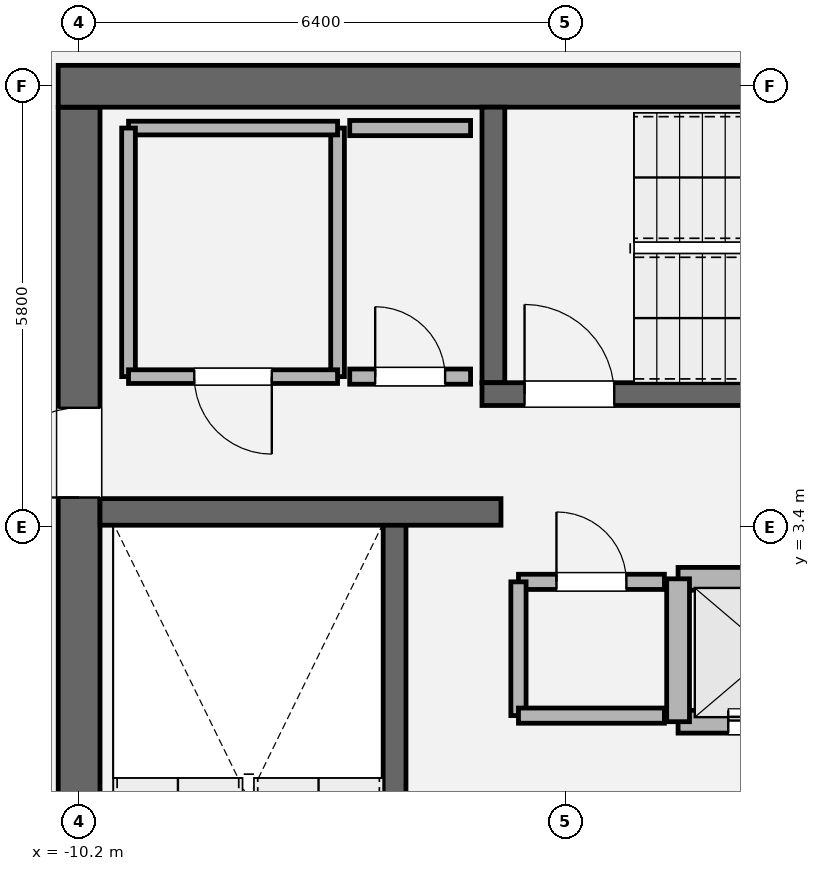
"""IFC4 building model, lengths in metres.
Left out: names, types, materials, properties, quantities, classifications, styles, units other than length and angle.
Written with IfcOpenShell. Run it as: python <this file> out.ifc"""

import sys

from ifc_helpers import new_model, si_unit, direction, frame, frame_2d, origin, place, context, subcontext, project, spatial, rectangle, extrude, element, fill, save


model = new_model("IFC4")
c1 = context("Model", 3, precision=1e-05, world=origin(), true_north=direction((0.0, 1.0)))
c2 = subcontext(c1, "Body", "Model", "MODEL_VIEW")
j1 = project(units=[si_unit("LENGTHUNIT", "METRE"), si_unit("PLANEANGLEUNIT", "RADIAN")], contexts=[c1])
p1 = place(None, origin())
s1 = spatial("IfcSite", under=j1, at=p1, CompositionType="ELEMENT")
p2 = place(p1, origin())
s2 = spatial("IfcBuilding", under=s1, at=p2, CompositionType="ELEMENT")
p3 = place(p2, frame((0.0, 0.0, 304.8)))
s3 = spatial("IfcBuildingStorey", under=s2, at=p3, CompositionType="ELEMENT", Elevation=304.8)
p4 = place(p3, frame((-10.2, -8.925, 0.0), z_axis=(0.0, 0.0, 1.0), x_axis=(0.0, 1.0, 0.0)))
e1 = element("IfcWall", 1, at=p4, inside=s3, PredefinedType="SHEAR", context=c2, shape_type="SweptSolid", body=[
    extrude(rectangle(XDim=17.85, YDim=0.55, at=frame_2d((8.925, 0.0))), origin(), (0.0, 0.0, 1.0), 4.2),
])
p5 = place(p4, frame((12.715, 0.0, 0.0)))
e2 = element("IfcOpeningElement", 2, at=p5, cuts=e1, PredefinedType="OPENING", context=c2, shape_type="SweptSolid", body=[
    extrude(rectangle(XDim=1.18, YDim=2.2, at=frame_2d((0.59, 1.1))), frame((0.0, 0.285, 0.0), z_axis=(0.0, -1.0, 0.0), x_axis=(1.0, 0.0, 0.0)), (0.0, 0.0, 1.0), 0.57),
])
p6 = place(p3, frame((-10.475, 9.2, 0.0), z_axis=(0.0, 0.0, 1.0), x_axis=(1.0, 0.0, 0.0)))
e3 = element("IfcWall", 3, at=p6, inside=s3, PredefinedType="SHEAR", context=c2, shape_type="SweptSolid", body=[
    extrude(rectangle(XDim=20.95, YDim=0.55, at=frame_2d((10.475, 0.0))), origin(), (0.0, 0.0, 1.0), 4.2),
])
p7 = place(p3, frame((-6.05, -5.5, 0.0), z_axis=(0.0, 0.0, 1.0), x_axis=(0.0, 1.0, 0.0)))
e4 = element("IfcWall", 4, at=p7, inside=s3, PredefinedType="SOLIDWALL", context=c2, shape_type="SweptSolid", body=[
    extrude(rectangle(XDim=8.95, YDim=0.3, at=frame_2d((4.475, 0.0))), origin(), (0.0, 0.0, 1.0), 4.2),
])
p8 = place(p3, frame((-4.75, 5.3, 0.0), z_axis=(0.0, 0.0, 1.0), x_axis=(0.0, 1.0, 0.0)))
e5 = element("IfcWall", 5, at=p8, inside=s3, PredefinedType="SOLIDWALL", context=c2, shape_type="SweptSolid", body=[
    extrude(rectangle(XDim=3.625, YDim=0.3, at=frame_2d((1.812, 0.0))), origin(), (0.0, 0.0, 1.0), 4.2),
])
p9 = place(p3, frame((-4.9, 5.15, 0.0), z_axis=(0.0, 0.0, 1.0), x_axis=(1.0, 0.0, 0.0)))
e6 = element("IfcWall", 6, at=p9, inside=s3, PredefinedType="SOLIDWALL", context=c2, shape_type="SweptSolid", body=[
    extrude(rectangle(XDim=9.8, YDim=0.3, at=frame_2d((4.9, 0.0))), origin(), (0.0, 0.0, 1.0), 4.2),
])
p10 = place(p9, frame((0.56, 0.0, 0.0)))
e7 = element("IfcOpeningElement", 7, at=p10, cuts=e6, PredefinedType="OPENING", context=c2, shape_type="SweptSolid", body=[
    extrude(rectangle(XDim=1.18, YDim=2.2, at=frame_2d((0.59, 1.1))), frame((0.0, 0.16, 0.0), z_axis=(0.0, -1.0, 0.0), x_axis=(1.0, 0.0, 0.0)), (0.0, 0.0, 1.0), 0.32),
])
p11 = place(p3, frame((-9.925, 3.6, 0.0), z_axis=(0.0, 0.0, 1.0), x_axis=(1.0, 0.0, 0.0)))
e8 = element("IfcWall", 8, at=p11, inside=s3, PredefinedType="SOLIDWALL", context=c2, shape_type="SweptSolid", body=[
    extrude(rectangle(XDim=5.275, YDim=0.35, at=frame_2d((2.638, 0.0))), origin(), (0.0, 0.0, 1.0), 4.2),
])
p12 = place(p3, frame((-2.32, 0.84, 0.0), z_axis=(0.0, 0.0, 1.0), x_axis=(1.0, 0.0, 0.0)))
e9 = element("IfcWall", 9, at=p12, inside=s3, PredefinedType="SOLIDWALL", context=c2, shape_type="SweptSolid", body=[
    extrude(rectangle(XDim=4.64, YDim=0.3, at=frame_2d((2.32, 0.0))), origin(), (0.0, 0.0, 1.0), 4.0),
])
p13 = place(p12, frame((0.66, 0.0, 0.0)))
e10 = element("IfcOpeningElement", 10, at=p13, cuts=e9, PredefinedType="OPENING", context=c2, shape_type="SweptSolid", body=[
    extrude(rectangle(XDim=1.12, YDim=2.25, at=frame_2d((0.56, 1.125))), frame((0.0, 0.16, 0.0), z_axis=(0.0, -1.0, 0.0), x_axis=(1.0, 0.0, 0.0)), (0.0, 0.0, 1.0), 0.32),
])
p14 = place(p12, frame((2.86, 0.0, 0.0)))
e11 = element("IfcOpeningElement", 11, at=p14, cuts=e9, PredefinedType="OPENING", context=c2, shape_type="SweptSolid", body=[
    extrude(rectangle(XDim=1.12, YDim=2.25, at=frame_2d((0.56, 1.125))), frame((0.0, 0.16, 0.0), z_axis=(0.0, -1.0, 0.0), x_axis=(1.0, 0.0, 0.0)), (0.0, 0.0, 1.0), 0.32),
])
p15 = place(p3, frame((-2.32, 2.72, 0.0), z_axis=(0.0, 0.0, 1.0), x_axis=(1.0, 0.0, 0.0)))
e12 = element("IfcWall", 12, at=p15, inside=s3, PredefinedType="SOLIDWALL", context=c2, shape_type="SweptSolid", body=[
    extrude(rectangle(XDim=4.64, YDim=0.3, at=frame_2d((2.32, 0.0))), origin(), (0.0, 0.0, 1.0), 4.0),
])
p16 = place(p3, frame((-2.32, 0.84, 0.0), z_axis=(0.0, 0.0, 1.0), x_axis=(0.0, 1.0, 0.0)))
e13 = element("IfcWall", 13, at=p16, inside=s3, PredefinedType="SOLIDWALL", context=c2, shape_type="SweptSolid", body=[
    extrude(rectangle(XDim=1.88, YDim=0.3, at=frame_2d((0.94, 0.0))), origin(), (0.0, 0.0, 1.0), 4.0),
])
p17 = place(p3, frame((-2.5, 2.68, 0.0), z_axis=(0.0, 0.0, 1.0), x_axis=(-1.0, 0.0, 0.0)))
e14 = element("IfcWall", 14, at=p17, inside=s3, PredefinedType="SOLIDWALL", context=c2, shape_type="SweptSolid", body=[
    extrude(rectangle(XDim=1.92, YDim=0.2, at=frame_2d((0.96, 0.0))), origin(), (0.0, 0.0, 1.0), 4.0),
])
p18 = place(p17, frame((0.5, 0.0, 0.0)))
e15 = element("IfcOpeningElement", 15, at=p18, cuts=e14, PredefinedType="OPENING", context=c2, shape_type="SweptSolid", body=[
    extrude(rectangle(XDim=0.92, YDim=2.1, at=frame_2d((0.46, 1.05))), frame((0.0, 0.11, 0.0), z_axis=(0.0, -1.0, 0.0), x_axis=(1.0, 0.0, 0.0)), (0.0, 0.0, 1.0), 0.22),
])
p19 = place(p3, frame((-4.42, 2.68, 0.0), z_axis=(0.0, 0.0, 1.0), x_axis=(0.0, -1.0, 0.0)))
e16 = element("IfcWall", 16, at=p19, inside=s3, PredefinedType="SOLIDWALL", context=c2, shape_type="SweptSolid", body=[
    extrude(rectangle(XDim=1.76, YDim=0.2, at=frame_2d((0.88, 0.0))), origin(), (0.0, 0.0, 1.0), 4.0),
])
p20 = place(p3, frame((-4.42, 0.92, 0.0), z_axis=(0.0, 0.0, 1.0), x_axis=(1.0, 0.0, 0.0)))
e17 = element("IfcWall", 17, at=p20, inside=s3, PredefinedType="SOLIDWALL", context=c2, shape_type="SweptSolid", body=[
    extrude(rectangle(XDim=1.92, YDim=0.2, at=frame_2d((0.96, 0.0))), origin(), (0.0, 0.0, 1.0), 4.0),
])
p21 = place(p3, frame((-6.8, 5.38, 0.0), z_axis=(0.0, 0.0, 1.0), x_axis=(0.0, 1.0, 0.0)))
e18 = element("IfcWall", 18, at=p21, inside=s3, PredefinedType="PARTITIONING", context=c2, shape_type="SweptSolid", body=[
    extrude(rectangle(XDim=3.27, YDim=0.18, at=frame_2d((1.635, 0.0))), origin(), (0.0, 0.0, 1.0), 4.0),
])
p22 = place(p3, frame((-6.8, 8.65, 0.0), z_axis=(0.0, 0.0, 1.0), x_axis=(-1.0, 0.0, 0.0)))
e19 = element("IfcWall", 19, at=p22, inside=s3, PredefinedType="PARTITIONING", context=c2, shape_type="SweptSolid", body=[
    extrude(rectangle(XDim=2.75, YDim=0.18, at=frame_2d((1.375, 0.0))), origin(), (0.0, 0.0, 1.0), 4.0),
])
p23 = place(p3, frame((-9.55, 8.65, 0.0), z_axis=(0.0, 0.0, 1.0), x_axis=(0.0, -1.0, 0.0)))
e20 = element("IfcWall", 20, at=p23, inside=s3, PredefinedType="PARTITIONING", context=c2, shape_type="SweptSolid", body=[
    extrude(rectangle(XDim=3.27, YDim=0.18, at=frame_2d((1.635, 0.0))), origin(), (0.0, 0.0, 1.0), 4.0),
])
p24 = place(p3, frame((-9.55, 5.38, 0.0), z_axis=(0.0, 0.0, 1.0), x_axis=(1.0, 0.0, 0.0)))
e21 = element("IfcWall", 21, at=p24, inside=s3, PredefinedType="PARTITIONING", context=c2, shape_type="SweptSolid", body=[
    extrude(rectangle(XDim=2.75, YDim=0.18, at=frame_2d((1.375, 0.0))), origin(), (0.0, 0.0, 1.0), 4.0),
])
p25 = place(p24, frame((0.865, 0.0, 0.0)))
e22 = element("IfcOpeningElement", 22, at=p25, cuts=e21, PredefinedType="OPENING", context=c2, shape_type="SweptSolid", body=[
    extrude(rectangle(XDim=1.02, YDim=2.2, at=frame_2d((0.51, 1.1))), frame((0.0, 0.1, 0.0), z_axis=(0.0, -1.0, 0.0), x_axis=(1.0, 0.0, 0.0)), (0.0, 0.0, 1.0), 0.2),
])
p26 = place(p3, frame((-5.05, 8.65, 0.0), z_axis=(0.0, 0.0, 1.0), x_axis=(-1.0, 0.0, 0.0)))
e23 = element("IfcWall", 23, at=p26, inside=s3, PredefinedType="SOLIDWALL", context=c2, shape_type="SweptSolid", body=[
    extrude(rectangle(XDim=1.59, YDim=0.2, at=frame_2d((0.795, 0.0))), origin(), (0.0, 0.0, 1.0), 4.0),
])
p27 = place(p3, frame((-6.64, 5.38, 0.0), z_axis=(0.0, 0.0, 1.0), x_axis=(1.0, 0.0, 0.0)))
e24 = element("IfcWall", 24, at=p27, inside=s3, PredefinedType="SOLIDWALL", context=c2, shape_type="SweptSolid", body=[
    extrude(rectangle(XDim=1.59, YDim=0.2, at=frame_2d((0.795, 0.0))), origin(), (0.0, 0.0, 1.0), 4.0),
])
p28 = place(p27, frame((0.335, 0.0, 0.0)))
e25 = element("IfcOpeningElement", 25, at=p28, cuts=e24, PredefinedType="OPENING", context=c2, shape_type="SweptSolid", body=[
    extrude(rectangle(XDim=0.92, YDim=2.1, at=frame_2d((0.46, 1.05))), frame((0.0, 0.11, 0.0), z_axis=(0.0, -1.0, 0.0), x_axis=(1.0, 0.0, 0.0)), (0.0, 0.0, 1.0), 0.22),
])
p29 = place(p10, origin())
e26 = element("IfcDoor", 26, at=p29, inside=s3, OperationType="SINGLE_SWING_LEFT", PredefinedType="DOOR", context=c2, shape_type="SweptSolid", body=[
    extrude(rectangle(XDim=1.18, YDim=2.2, at=frame_2d((0.59, 1.1))), frame((0.0, 0.025, 0.0), z_axis=(0.0, -1.0, 0.0), x_axis=(1.0, 0.0, 0.0)), (0.0, 0.0, 1.0), 0.05),
])
fill(e7, e26)
p30 = place(p5, origin())
e27 = element("IfcDoor", 27, at=p30, inside=s3, OperationType="SINGLE_SWING_LEFT", PredefinedType="DOOR", context=c2, shape_type="SweptSolid", body=[
    extrude(rectangle(XDim=1.18, YDim=2.2, at=frame_2d((0.59, 1.1))), frame((0.0, 0.025, 0.0), z_axis=(0.0, -1.0, 0.0), x_axis=(1.0, 0.0, 0.0)), (0.0, 0.0, 1.0), 0.05),
])
fill(e2, e27)
p31 = place(p13, origin())
e28 = element("IfcDoor", 28, at=p31, inside=s3, OperationType="DOUBLE_DOOR_SLIDING", PredefinedType="DOOR", context=c2, shape_type="SweptSolid", body=[
    extrude(rectangle(XDim=1.12, YDim=2.25, at=frame_2d((0.56, 1.125))), frame((0.0, 0.025, 0.0), z_axis=(0.0, -1.0, 0.0), x_axis=(1.0, 0.0, 0.0)), (0.0, 0.0, 1.0), 0.05),
])
fill(e10, e28)
p32 = place(p18, origin())
e29 = element("IfcDoor", 29, at=p32, inside=s3, OperationType="SINGLE_SWING_RIGHT", PredefinedType="DOOR", context=c2, shape_type="SweptSolid", body=[
    extrude(rectangle(XDim=0.92, YDim=2.1, at=frame_2d((0.46, 1.05))), frame((0.0, 0.025, 0.0), z_axis=(0.0, -1.0, 0.0), x_axis=(1.0, 0.0, 0.0)), (0.0, 0.0, 1.0), 0.05),
])
fill(e15, e29)
p33 = place(p25, origin())
e30 = element("IfcDoor", 30, at=p33, inside=s3, OperationType="SINGLE_SWING_RIGHT", PredefinedType="DOOR", context=c2, shape_type="SweptSolid", body=[
    extrude(rectangle(XDim=1.02, YDim=2.2, at=frame_2d((0.51, 1.1))), frame((0.0, 0.025, 0.0), z_axis=(0.0, -1.0, 0.0), x_axis=(1.0, 0.0, 0.0)), (0.0, 0.0, 1.0), 0.05),
])
fill(e22, e30)
p34 = place(p28, origin())
e31 = element("IfcDoor", 31, at=p34, inside=s3, OperationType="SINGLE_SWING_LEFT", PredefinedType="DOOR", context=c2, shape_type="SweptSolid", body=[
    extrude(rectangle(XDim=0.92, YDim=2.1, at=frame_2d((0.46, 1.05))), frame((0.0, 0.025, 0.0), z_axis=(0.0, -1.0, 0.0), x_axis=(1.0, 0.0, 0.0)), (0.0, 0.0, 1.0), 0.05),
])
fill(e25, e31)
save(model, sys.argv[1])
